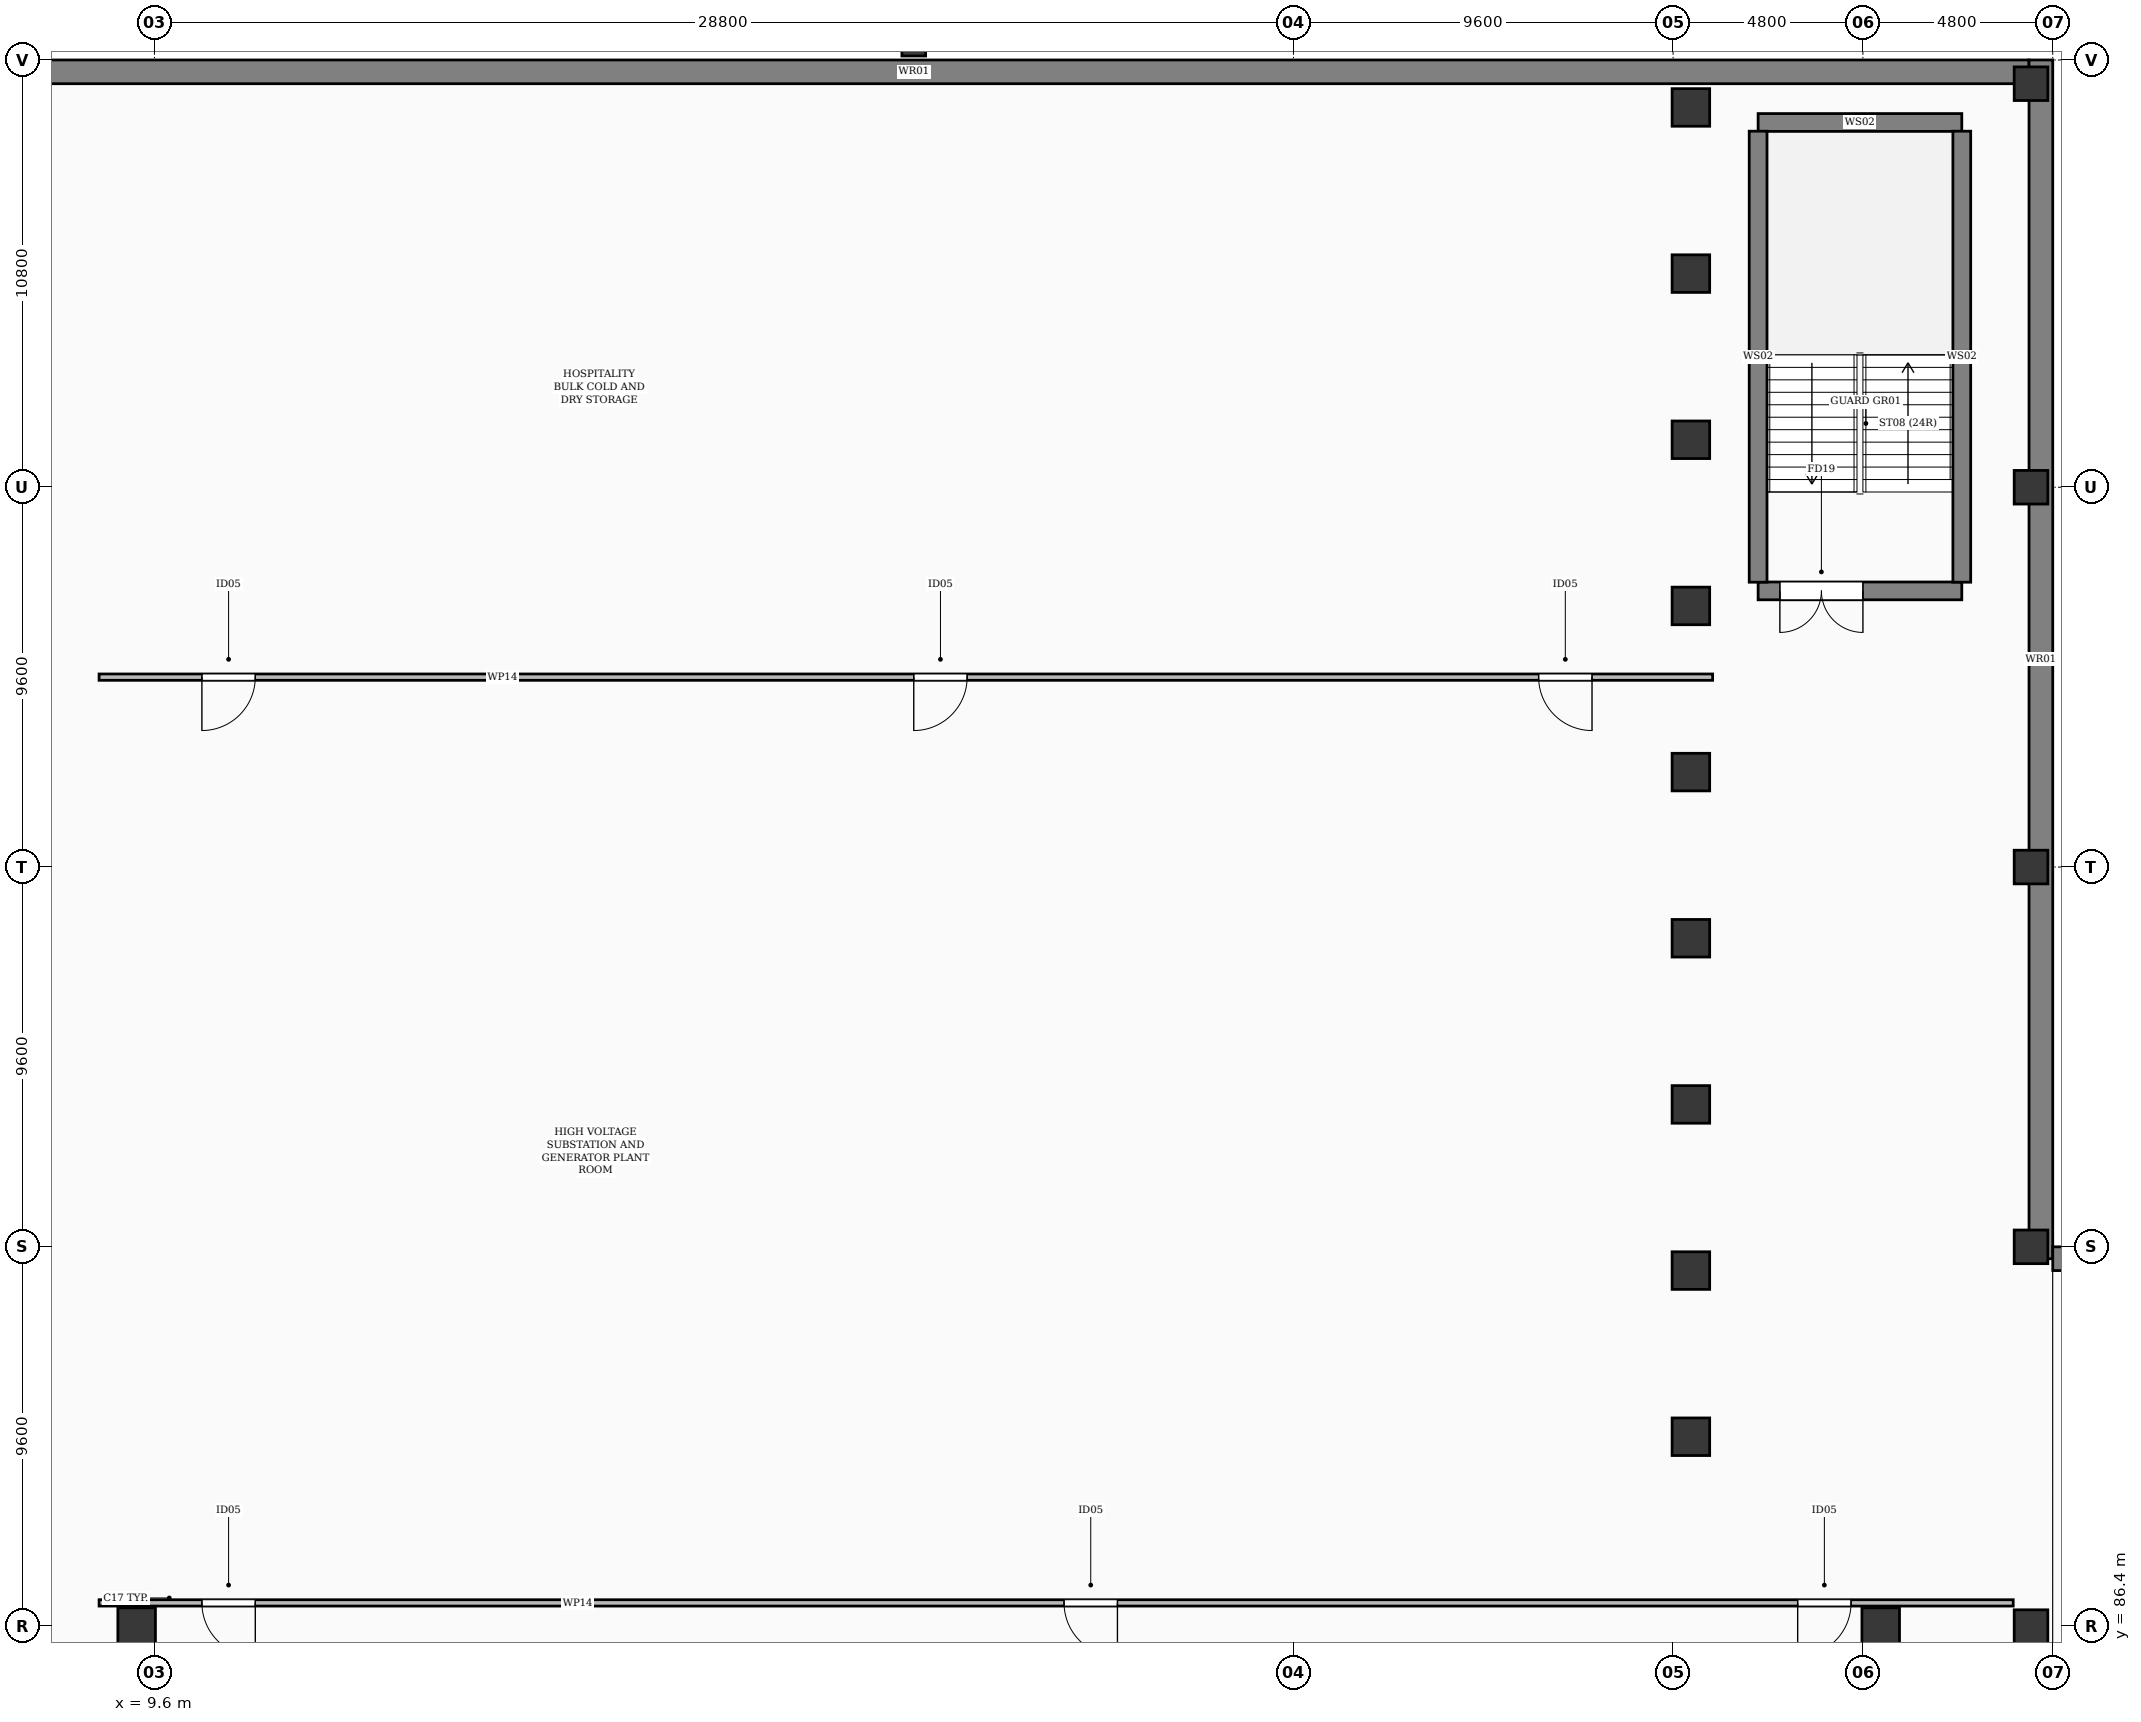
"""IFC4 building model, lengths in metres.
Left out: names, types, materials, properties, quantities, classifications, styles, units other than length and angle.
Written with IfcOpenShell. Run it as: python <this file> out.ifc"""

import sys

from ifc_helpers import new_model, si_unit, direction, frame, frame_2d, origin, origin_2d, place, context, subcontext, project, spatial, rectangle, extrude, element, fill, save


model = new_model("IFC4")
c1 = context("Model", 3, precision=1e-05, world=origin(), true_north=direction((0.0, 1.0)))
c2 = subcontext(c1, "Body", "Model", "MODEL_VIEW")
j1 = project(units=[si_unit("LENGTHUNIT", "METRE"), si_unit("PLANEANGLEUNIT", "RADIAN")], contexts=[c1])
p1 = place(None, origin())
s1 = spatial("IfcSite", under=j1, at=p1, CompositionType="ELEMENT")
p2 = place(p1, origin())
s2 = spatial("IfcBuilding", under=s1, at=p2, CompositionType="ELEMENT")
p3 = place(p2, frame((0.0, 0.0, -8.4)))
s3 = spatial("IfcBuildingStorey", under=s2, at=p3, CompositionType="ELEMENT", Elevation=-8.4)
p4 = place(p3, frame((57.05, 86.4, 0.0), z_axis=(0.0, 0.0, 1.0), x_axis=(1.0, 0.0, 0.0)))
e1 = element("IfcColumn", 1, at=p4, inside=s3, PredefinedType="COLUMN", context=c2, shape_type="SweptSolid", body=[
    extrude(rectangle(XDim=0.85, YDim=0.85, at=origin_2d()), origin(), (0.0, 0.0, 1.0), 4.2),
])
for number, where, z_axis, x_axis in (
    (2, (9.15, 86.4, 0.0), (0.0, 0.0, 1.0), (1.0, 0.0, 0.0)),
    (3, (53.25, 86.4, 0.0), (0.0, 0.0, 1.0), (1.0, 0.0, 0.0)),
    (4, (48.45, 91.2, 0.0), (0.0, 0.0, 1.0), (1.0, 0.0, 0.0)),
    (5, (48.45, 95.4, 0.0), (0.0, 0.0, 1.0), (1.0, 0.0, 0.0)),
    (6, (48.45, 99.6, 0.0), (0.0, 0.0, 1.0), (1.0, 0.0, 0.0)),
    (7, (48.45, 103.8, 0.0), (0.0, 0.0, 1.0), (1.0, 0.0, 0.0)),
    (8, (48.45, 108.0, 0.0), (0.0, 0.0, 1.0), (1.0, 0.0, 0.0)),
    (9, (48.45, 112.2, 0.0), (0.0, 0.0, 1.0), (1.0, 0.0, 0.0)),
    (10, (48.45, 116.4, 0.0), (0.0, 0.0, 1.0), (1.0, 0.0, 0.0)),
    (11, (48.45, 120.6, 0.0), (0.0, 0.0, 1.0), (1.0, 0.0, 0.0)),
    (12, (48.45, 124.8, 0.0), (0.0, 0.0, 1.0), (1.0, 0.0, 0.0)),
):
    element("IfcColumn", number, at=place(p3, frame(where, z_axis=z_axis, x_axis=x_axis)), inside=s3, PredefinedType="COLUMN", context=c2, shape_type="SweptSolid", body=[
        extrude(rectangle(XDim=0.95, YDim=0.95, at=origin_2d()), origin(), (0.0, 0.0, 1.0), 4.2),
    ])
for number, where, z_axis, x_axis in (
    (13, (57.05, 96.0, 0.0), (0.0, 0.0, 1.0), (1.0, 0.0, 0.0)),
    (14, (57.05, 105.6, 0.0), (0.0, 0.0, 1.0), (1.0, 0.0, 0.0)),
    (15, (57.05, 115.2, 0.0), (0.0, 0.0, 1.0), (1.0, 0.0, 0.0)),
    (16, (57.05, 125.4, 0.0), (0.0, 0.0, 1.0), (1.0, 0.0, 0.0)),
):
    element("IfcColumn", number, at=place(p3, frame(where, z_axis=z_axis, x_axis=x_axis)), inside=s3, PredefinedType="COLUMN", context=c2, shape_type="SweptSolid", body=[
        extrude(rectangle(XDim=0.85, YDim=0.85, at=origin_2d()), origin(), (0.0, 0.0, 1.0), 4.2),
    ])
p5 = place(p3, frame((28.8, 126.4, 0.0), z_axis=(0.0, 0.0, 1.0), x_axis=(1.0, 0.0, 0.0)))
e17 = element("IfcColumn", 17, at=p5, inside=s3, PredefinedType="COLUMN", context=c2, shape_type="SweptSolid", body=[
    extrude(rectangle(XDim=0.6, YDim=0.6, at=origin_2d()), origin(), (0.0, 0.0, 1.0), 4.2),
])
p6 = place(p3, frame((0.6, 125.7, 0.0), z_axis=(0.0, 0.0, 1.0), x_axis=(1.0, 0.0, 0.0)))
e18 = element("IfcWall", 18, at=p6, inside=s3, PredefinedType="USERDEFINED", context=c2, shape_type="SweptSolid", body=[
    extrude(rectangle(XDim=56.4, YDim=0.6, at=frame_2d((28.2, 0.0))), origin(), (0.0, 0.0, 1.0), 3.86),
])
p7 = place(p3, frame((57.3, 126.0, 0.0), z_axis=(0.0, 0.0, 1.0), x_axis=(0.0, -1.0, 0.0)))
e19 = element("IfcWall", 19, at=p7, inside=s3, PredefinedType="USERDEFINED", context=c2, shape_type="SweptSolid", body=[
    extrude(rectangle(XDim=30.3, YDim=0.6, at=frame_2d((15.15, 0.0))), origin(), (0.0, 0.0, 1.0), 3.86),
])
p8 = place(p3, frame((57.6, 95.7, 0.0), z_axis=(0.0, 0.0, 1.0), x_axis=(1.0, 0.0, 0.0)))
e20 = element("IfcWall", 20, at=p8, inside=s3, PredefinedType="USERDEFINED", context=c2, shape_type="SweptSolid", body=[
    extrude(rectangle(XDim=90.6, YDim=0.6, at=frame_2d((45.3, 0.0))), origin(), (0.0, 0.0, 1.0), 3.86),
])
p9 = place(p3, frame((50.15, 112.58, 0.0), z_axis=(0.0, 0.0, 1.0), x_axis=(1.0, 0.0, 0.0)))
e21 = element("IfcWall", 21, at=p9, inside=s3, PredefinedType="SHEAR", context=c2, shape_type="SweptSolid", body=[
    extrude(rectangle(XDim=5.15, YDim=0.45, at=frame_2d((2.575, 0.0))), origin(), (0.0, 0.0, 1.0), 3.86),
])
p10 = place(p9, frame((0.55, 0.0, 0.0)))
e22 = element("IfcOpeningElement", 22, at=p10, cuts=e21, PredefinedType="OPENING", context=c2, shape_type="SweptSolid", body=[
    extrude(rectangle(XDim=2.1, YDim=2.2, at=frame_2d((1.05, 1.1))), frame((0.0, 0.237, 0.0), z_axis=(0.0, -1.0, 0.0), x_axis=(1.0, 0.0, 0.0)), (0.0, 0.0, 1.0), 0.474),
])
p11 = place(p3, frame((50.15, 124.42, 0.0), z_axis=(0.0, 0.0, 1.0), x_axis=(1.0, 0.0, 0.0)))
e23 = element("IfcWall", 23, at=p11, inside=s3, PredefinedType="SHEAR", context=c2, shape_type="SweptSolid", body=[
    extrude(rectangle(XDim=5.15, YDim=0.45, at=frame_2d((2.575, 0.0))), origin(), (0.0, 0.0, 1.0), 3.86),
])
for number, where, z_axis, x_axis in (
    (24, (50.15, 112.8, 0.0), (0.0, 0.0, 1.0), (0.0, 1.0, 0.0)),
    (25, (55.3, 112.8, 0.0), (0.0, 0.0, 1.0), (0.0, 1.0, 0.0)),
):
    element("IfcWall", number, at=place(p3, frame(where, z_axis=z_axis, x_axis=x_axis)), inside=s3, PredefinedType="SHEAR", context=c2, shape_type="SweptSolid", body=[
        extrude(rectangle(XDim=11.4, YDim=0.45, at=frame_2d((5.7, 0.0))), origin(), (0.0, 0.0, 1.0), 3.86),
    ])
p12 = place(p3, frame((8.2, 87.0, 0.0), z_axis=(0.0, 0.0, 1.0), x_axis=(1.0, 0.0, 0.0)))
e26 = element("IfcWall", 26, at=p12, inside=s3, PredefinedType="PARTITIONING", context=c2, shape_type="SweptSolid", body=[
    extrude(rectangle(XDim=48.4, YDim=0.16, at=frame_2d((24.2, 0.0))), origin(), (0.0, 0.0, 1.0), 3.86),
])
p13 = place(p12, frame((2.6, 0.0, 0.0)))
e27 = element("IfcOpeningElement", 27, at=p13, cuts=e26, PredefinedType="OPENING", context=c2, shape_type="SweptSolid", body=[
    extrude(rectangle(XDim=1.35, YDim=2.2, at=frame_2d((0.675, 1.1))), frame((0.0, 0.092, 0.0), z_axis=(0.0, -1.0, 0.0), x_axis=(1.0, 0.0, 0.0)), (0.0, 0.0, 1.0), 0.184),
])
p14 = place(p12, frame((42.95, 0.0, 0.0)))
e28 = element("IfcOpeningElement", 28, at=p14, cuts=e26, PredefinedType="OPENING", context=c2, shape_type="SweptSolid", body=[
    extrude(rectangle(XDim=1.35, YDim=2.2, at=frame_2d((0.675, 1.1))), frame((0.0, 0.092, 0.0), z_axis=(0.0, -1.0, 0.0), x_axis=(1.0, 0.0, 0.0)), (0.0, 0.0, 1.0), 0.184),
])
p15 = place(p12, frame((24.4, 0.0, 0.0)))
e29 = element("IfcOpeningElement", 29, at=p15, cuts=e26, PredefinedType="OPENING", context=c2, shape_type="SweptSolid", body=[
    extrude(rectangle(XDim=1.35, YDim=2.2, at=frame_2d((0.675, 1.1))), frame((0.0, 0.092, 0.0), z_axis=(0.0, -1.0, 0.0), x_axis=(1.0, 0.0, 0.0)), (0.0, 0.0, 1.0), 0.184),
])
p16 = place(p3, frame((8.2, 110.4, 0.0), z_axis=(0.0, 0.0, 1.0), x_axis=(1.0, 0.0, 0.0)))
e30 = element("IfcWall", 30, at=p16, inside=s3, PredefinedType="PARTITIONING", context=c2, shape_type="SweptSolid", body=[
    extrude(rectangle(XDim=40.8, YDim=0.16, at=frame_2d((20.4, 0.0))), origin(), (0.0, 0.0, 1.0), 2.972),
])
p17 = place(p16, frame((2.6, 0.0, 0.0)))
e31 = element("IfcOpeningElement", 31, at=p17, cuts=e30, PredefinedType="OPENING", context=c2, shape_type="SweptSolid", body=[
    extrude(rectangle(XDim=1.35, YDim=2.2, at=frame_2d((0.675, 1.1))), frame((0.0, 0.092, 0.0), z_axis=(0.0, -1.0, 0.0), x_axis=(1.0, 0.0, 0.0)), (0.0, 0.0, 1.0), 0.184),
])
p18 = place(p16, frame((36.4, 0.0, 0.0)))
e32 = element("IfcOpeningElement", 32, at=p18, cuts=e30, PredefinedType="OPENING", context=c2, shape_type="SweptSolid", body=[
    extrude(rectangle(XDim=1.35, YDim=2.2, at=frame_2d((0.675, 1.1))), frame((0.0, 0.092, 0.0), z_axis=(0.0, -1.0, 0.0), x_axis=(1.0, 0.0, 0.0)), (0.0, 0.0, 1.0), 0.184),
])
p19 = place(p16, frame((20.6, 0.0, 0.0)))
e33 = element("IfcOpeningElement", 33, at=p19, cuts=e30, PredefinedType="OPENING", context=c2, shape_type="SweptSolid", body=[
    extrude(rectangle(XDim=1.35, YDim=2.2, at=frame_2d((0.675, 1.1))), frame((0.0, 0.092, 0.0), z_axis=(0.0, -1.0, 0.0), x_axis=(1.0, 0.0, 0.0)), (0.0, 0.0, 1.0), 0.184),
])
p20 = place(p10, frame((2.1, 0.0, 0.0), z_axis=(0.0, 0.0, 1.0), x_axis=(-1.0, 0.0, 0.0)))
e34 = element("IfcDoor", 34, at=p20, inside=s3, OperationType="DOUBLE_DOOR_SINGLE_SWING", PredefinedType="DOOR", context=c2, shape_type="SweptSolid", body=[
    extrude(rectangle(XDim=2.1, YDim=2.2, at=frame_2d((1.05, 1.1))), frame((0.0, 0.025, 0.0), z_axis=(0.0, -1.0, 0.0), x_axis=(1.0, 0.0, 0.0)), (0.0, 0.0, 1.0), 0.05),
])
fill(e22, e34)
p21 = place(p13, frame((1.35, 0.0, 0.0), z_axis=(0.0, 0.0, 1.0), x_axis=(-1.0, 0.0, 0.0)))
e35 = element("IfcDoor", 35, at=p21, inside=s3, OperationType="SINGLE_SWING_RIGHT", PredefinedType="DOOR", context=c2, shape_type="SweptSolid", body=[
    extrude(rectangle(XDim=1.35, YDim=2.2, at=frame_2d((0.675, 1.1))), frame((0.0, 0.025, 0.0), z_axis=(0.0, -1.0, 0.0), x_axis=(1.0, 0.0, 0.0)), (0.0, 0.0, 1.0), 0.05),
])
fill(e27, e35)
p22 = place(p14, frame((1.35, 0.0, 0.0), z_axis=(0.0, 0.0, 1.0), x_axis=(-1.0, 0.0, 0.0)))
e36 = element("IfcDoor", 36, at=p22, inside=s3, OperationType="SINGLE_SWING_LEFT", PredefinedType="DOOR", context=c2, shape_type="SweptSolid", body=[
    extrude(rectangle(XDim=1.35, YDim=2.2, at=frame_2d((0.675, 1.1))), frame((0.0, 0.025, 0.0), z_axis=(0.0, -1.0, 0.0), x_axis=(1.0, 0.0, 0.0)), (0.0, 0.0, 1.0), 0.05),
])
fill(e28, e36)
p23 = place(p15, frame((1.35, 0.0, 0.0), z_axis=(0.0, 0.0, 1.0), x_axis=(-1.0, 0.0, 0.0)))
e37 = element("IfcDoor", 37, at=p23, inside=s3, OperationType="SINGLE_SWING_RIGHT", PredefinedType="DOOR", context=c2, shape_type="SweptSolid", body=[
    extrude(rectangle(XDim=1.35, YDim=2.2, at=frame_2d((0.675, 1.1))), frame((0.0, 0.025, 0.0), z_axis=(0.0, -1.0, 0.0), x_axis=(1.0, 0.0, 0.0)), (0.0, 0.0, 1.0), 0.05),
])
fill(e29, e37)
p24 = place(p17, frame((1.35, 0.0, 0.0), z_axis=(0.0, 0.0, 1.0), x_axis=(-1.0, 0.0, 0.0)))
e38 = element("IfcDoor", 38, at=p24, inside=s3, OperationType="SINGLE_SWING_LEFT", PredefinedType="DOOR", context=c2, shape_type="SweptSolid", body=[
    extrude(rectangle(XDim=1.35, YDim=2.2, at=frame_2d((0.675, 1.1))), frame((0.0, 0.025, 0.0), z_axis=(0.0, -1.0, 0.0), x_axis=(1.0, 0.0, 0.0)), (0.0, 0.0, 1.0), 0.05),
])
fill(e31, e38)
p25 = place(p18, frame((1.35, 0.0, 0.0), z_axis=(0.0, 0.0, 1.0), x_axis=(-1.0, 0.0, 0.0)))
e39 = element("IfcDoor", 39, at=p25, inside=s3, OperationType="SINGLE_SWING_RIGHT", PredefinedType="DOOR", context=c2, shape_type="SweptSolid", body=[
    extrude(rectangle(XDim=1.35, YDim=2.2, at=frame_2d((0.675, 1.1))), frame((0.0, 0.025, 0.0), z_axis=(0.0, -1.0, 0.0), x_axis=(1.0, 0.0, 0.0)), (0.0, 0.0, 1.0), 0.05),
])
fill(e32, e39)
p26 = place(p19, frame((1.35, 0.0, 0.0), z_axis=(0.0, 0.0, 1.0), x_axis=(-1.0, 0.0, 0.0)))
e40 = element("IfcDoor", 40, at=p26, inside=s3, OperationType="SINGLE_SWING_LEFT", PredefinedType="DOOR", context=c2, shape_type="SweptSolid", body=[
    extrude(rectangle(XDim=1.35, YDim=2.2, at=frame_2d((0.675, 1.1))), frame((0.0, 0.025, 0.0), z_axis=(0.0, -1.0, 0.0), x_axis=(1.0, 0.0, 0.0)), (0.0, 0.0, 1.0), 0.05),
])
fill(e33, e40)
save(model, sys.argv[1])
